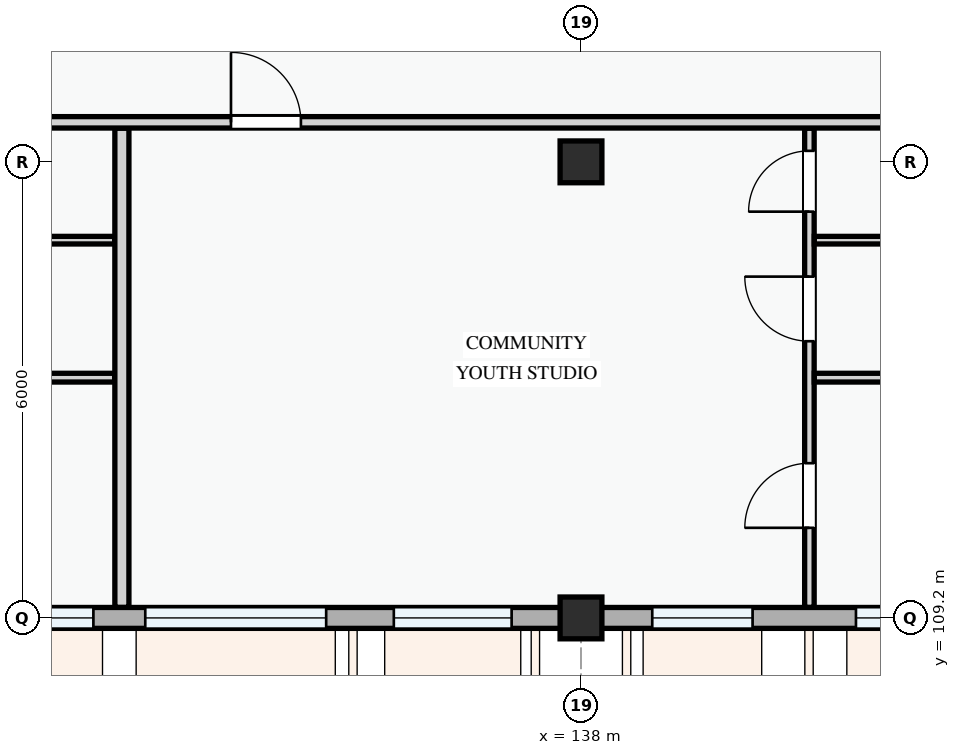
"""IFC4 building model, lengths in metres.
Left out: names, types, materials, properties, quantities, classifications, styles, units other than length and angle.
Written with IfcOpenShell. Run it as: python <this file> out.ifc"""

import sys

from ifc_helpers import new_model, si_unit, direction, frame, frame_2d, origin, origin_2d, place, context, subcontext, project, spatial, rectangle, extrude, element, fill, save


model = new_model("IFC4")
c1 = context("Model", 3, precision=1e-05, world=origin(), true_north=direction((0.0, 1.0)))
c2 = subcontext(c1, "Body", "Model", "MODEL_VIEW")
j1 = project(units=[si_unit("LENGTHUNIT", "METRE"), si_unit("PLANEANGLEUNIT", "RADIAN")], contexts=[c1])
p1 = place(None, origin())
s1 = spatial("IfcSite", under=j1, at=p1, CompositionType="ELEMENT")
p2 = place(p1, origin())
s2 = spatial("IfcBuilding", under=s1, at=p2, CompositionType="ELEMENT")
p3 = place(p2, frame((0.0, 0.0, 27.9)))
s3 = spatial("IfcBuildingStorey", under=s2, at=p3, CompositionType="ELEMENT", Elevation=27.9)
for number, where, z_axis, x_axis in (
    (1, (138.0, 109.2, 0.0), (0.0, 0.0, 1.0), (1.0, 0.0, 0.0)),
    (2, (138.0, 115.2, 0.0), (0.0, 0.0, 1.0), (1.0, 0.0, 0.0)),
):
    element("IfcColumn", number, at=place(p3, frame(where, z_axis=z_axis, x_axis=x_axis)), inside=s3, PredefinedType="COLUMN", context=c2, shape_type="SweptSolid", body=[
        extrude(rectangle(XDim=0.55, YDim=0.55, at=origin_2d()), origin(), (0.0, 0.0, 1.0), 3.3),
    ])
p4 = place(p3, frame((129.6, 109.2, 0.0), z_axis=(0.0, 0.0, 1.0), x_axis=(1.0, 0.0, 0.0)))
e3 = element("IfcWall", 3, at=p4, inside=s3, PredefinedType="STANDARD", context=c2, shape_type="SweptSolid", body=[
    extrude(rectangle(XDim=8.4, YDim=0.275, at=frame_2d((4.2, 0.0))), origin(), (0.0, 0.0, 1.0), 2.375),
])
p5 = place(p4, frame((0.565, 0.0, 0.78)))
e4 = element("IfcOpeningElement", 4, at=p5, cuts=e3, PredefinedType="OPENING", context=c2, shape_type="SweptSolid", body=[
    extrude(rectangle(XDim=1.42, YDim=1.38, at=frame_2d((0.71, 0.69))), frame((0.0, 0.147, 0.0), z_axis=(0.0, -1.0, 0.0), x_axis=(1.0, 0.0, 0.0)), (0.0, 0.0, 1.0), 0.295),
])
p6 = place(p4, frame((2.667, 0.0, 0.78)))
e5 = element("IfcOpeningElement", 5, at=p6, cuts=e3, PredefinedType="OPENING", context=c2, shape_type="SweptSolid", body=[
    extrude(rectangle(XDim=2.38, YDim=1.48, at=frame_2d((1.19, 0.74))), frame((0.0, 0.147, 0.0), z_axis=(0.0, -1.0, 0.0), x_axis=(1.0, 0.0, 0.0)), (0.0, 0.0, 1.0), 0.295),
])
p7 = place(p4, frame((5.938, 0.0, 0.78)))
e6 = element("IfcOpeningElement", 6, at=p7, cuts=e3, PredefinedType="OPENING", context=c2, shape_type="SweptSolid", body=[
    extrude(rectangle(XDim=1.55, YDim=1.4, at=frame_2d((0.775, 0.7))), frame((0.0, 0.147, 0.0), z_axis=(0.0, -1.0, 0.0), x_axis=(1.0, 0.0, 0.0)), (0.0, 0.0, 1.0), 0.295),
])
p8 = place(p3, frame((138.0, 109.2, 0.0), z_axis=(0.0, 0.0, 1.0), x_axis=(1.0, 0.0, 0.0)))
e7 = element("IfcWall", 7, at=p8, inside=s3, PredefinedType="STANDARD", context=c2, shape_type="SweptSolid", body=[
    extrude(rectangle(XDim=6.0, YDim=0.275, at=frame_2d((3.0, 0.0))), origin(), (0.0, 0.0, 1.0), 2.475),
])
p9 = place(p8, frame((0.938, 0.0, 0.78)))
e8 = element("IfcOpeningElement", 8, at=p9, cuts=e7, PredefinedType="OPENING", context=c2, shape_type="SweptSolid", body=[
    extrude(rectangle(XDim=1.32, YDim=1.35, at=frame_2d((0.66, 0.675))), frame((0.0, 0.147, 0.0), z_axis=(0.0, -1.0, 0.0), x_axis=(1.0, 0.0, 0.0)), (0.0, 0.0, 1.0), 0.295),
])
p10 = place(p8, frame((3.617, 0.0, 0.78)))
e9 = element("IfcOpeningElement", 9, at=p10, cuts=e7, PredefinedType="OPENING", context=c2, shape_type="SweptSolid", body=[
    extrude(rectangle(XDim=1.58, YDim=1.48, at=frame_2d((0.79, 0.74))), frame((0.0, 0.147, 0.0), z_axis=(0.0, -1.0, 0.0), x_axis=(1.0, 0.0, 0.0)), (0.0, 0.0, 1.0), 0.295),
])
p11 = place(p3, frame((119.494, 112.361, 0.0), z_axis=(0.0, 0.0, 1.0), x_axis=(1.0, 0.0, 0.0)))
e10 = element("IfcWall", 10, at=p11, inside=s3, PredefinedType="PARTITIONING", context=c2, shape_type="SweptSolid", body=[
    extrude(rectangle(XDim=12.371, YDim=0.115, at=frame_2d((6.186, 0.0))), origin(), (0.0, 0.0, 1.0), 3.0),
])
p12 = place(p3, frame((119.494, 114.17, 0.0), z_axis=(0.0, 0.0, 1.0), x_axis=(1.0, 0.0, 0.0)))
e11 = element("IfcWall", 11, at=p12, inside=s3, PredefinedType="PARTITIONING", context=c2, shape_type="SweptSolid", body=[
    extrude(rectangle(XDim=12.371, YDim=0.1, at=frame_2d((6.186, 0.0))), origin(), (0.0, 0.0, 1.0), 3.0),
])
p13 = place(p3, frame((141.005, 109.34, 0.0), z_axis=(0.0, 0.0, 1.0), x_axis=(0.0, 1.0, 0.0)))
e12 = element("IfcWall", 12, at=p13, inside=s3, PredefinedType="PARTITIONING", context=c2, shape_type="SweptSolid", body=[
    extrude(rectangle(XDim=6.303, YDim=0.125, at=frame_2d((3.152, 0.0))), origin(), (0.0, 0.0, 1.0), 3.0),
])
p14 = place(p13, frame((1.046, 0.0, 0.0)))
e13 = element("IfcOpeningElement", 13, at=p14, cuts=e12, PredefinedType="OPENING", context=c2, shape_type="SweptSolid", body=[
    extrude(rectangle(XDim=0.85, YDim=2.1, at=frame_2d((0.425, 1.05))), frame((0.0, 0.073, 0.0), z_axis=(0.0, -1.0, 0.0), x_axis=(1.0, 0.0, 0.0)), (0.0, 0.0, 1.0), 0.145),
])
p15 = place(p13, frame((3.501, 0.0, 0.0)))
e14 = element("IfcOpeningElement", 14, at=p15, cuts=e12, PredefinedType="OPENING", context=c2, shape_type="SweptSolid", body=[
    extrude(rectangle(XDim=0.85, YDim=2.1, at=frame_2d((0.425, 1.05))), frame((0.0, 0.073, 0.0), z_axis=(0.0, -1.0, 0.0), x_axis=(1.0, 0.0, 0.0)), (0.0, 0.0, 1.0), 0.145),
])
p16 = place(p13, frame((5.205, 0.0, 0.0)))
e15 = element("IfcOpeningElement", 15, at=p16, cuts=e12, PredefinedType="OPENING", context=c2, shape_type="SweptSolid", body=[
    extrude(rectangle(XDim=0.8, YDim=2.1, at=frame_2d((0.4, 1.05))), frame((0.0, 0.073, 0.0), z_axis=(0.0, -1.0, 0.0), x_axis=(1.0, 0.0, 0.0)), (0.0, 0.0, 1.0), 0.145),
])
p17 = place(p3, frame((141.07, 112.361, 0.0), z_axis=(0.0, 0.0, 1.0), x_axis=(1.0, 0.0, 0.0)))
e16 = element("IfcWall", 16, at=p17, inside=s3, PredefinedType="PARTITIONING", context=c2, shape_type="SweptSolid", body=[
    extrude(rectangle(XDim=8.903, YDim=0.115, at=frame_2d((4.452, 0.0))), origin(), (0.0, 0.0, 1.0), 3.0),
])
p18 = place(p3, frame((141.07, 114.17, 0.0), z_axis=(0.0, 0.0, 1.0), x_axis=(1.0, 0.0, 0.0)))
e17 = element("IfcWall", 17, at=p18, inside=s3, PredefinedType="PARTITIONING", context=c2, shape_type="SweptSolid", body=[
    extrude(rectangle(XDim=8.903, YDim=0.1, at=frame_2d((4.452, 0.0))), origin(), (0.0, 0.0, 1.0), 3.0),
])
p19 = place(p3, frame((131.96, 109.34, 0.0), z_axis=(0.0, 0.0, 1.0), x_axis=(0.0, 1.0, 0.0)))
e18 = element("IfcWall", 18, at=p19, inside=s3, PredefinedType="PARTITIONING", context=c2, shape_type="SweptSolid", body=[
    extrude(rectangle(XDim=6.303, YDim=0.185, at=frame_2d((3.152, 0.0))), origin(), (0.0, 0.0, 1.0), 3.0),
])
p20 = place(p3, frame((80.54, 115.72, 0.0), z_axis=(0.0, 0.0, 1.0), x_axis=(1.0, 0.0, 0.0)))
e19 = element("IfcWall", 19, at=p20, inside=s3, PredefinedType="PARTITIONING", context=c2, shape_type="SweptSolid", body=[
    extrude(rectangle(XDim=69.51, YDim=0.15, at=frame_2d((34.755, 0.0))), origin(), (0.0, 0.0, 1.0), 3.0),
])
p21 = place(p20, frame((9.587, 0.0, 0.0)))
e20 = element("IfcOpeningElement", 20, at=p21, cuts=e19, PredefinedType="OPENING", context=c2, shape_type="SweptSolid", body=[
    extrude(rectangle(XDim=0.92, YDim=2.1, at=frame_2d((0.46, 1.05))), frame((0.0, 0.085, 0.0), z_axis=(0.0, -1.0, 0.0), x_axis=(1.0, 0.0, 0.0)), (0.0, 0.0, 1.0), 0.17),
])
p22 = place(p20, frame((37.68, 0.0, 0.0)))
e21 = element("IfcOpeningElement", 21, at=p22, cuts=e19, PredefinedType="OPENING", context=c2, shape_type="SweptSolid", body=[
    extrude(rectangle(XDim=0.92, YDim=2.1, at=frame_2d((0.46, 1.05))), frame((0.0, 0.085, 0.0), z_axis=(0.0, -1.0, 0.0), x_axis=(1.0, 0.0, 0.0)), (0.0, 0.0, 1.0), 0.17),
])
p23 = place(p20, frame((52.856, 0.0, 0.0)))
e22 = element("IfcOpeningElement", 22, at=p23, cuts=e19, PredefinedType="OPENING", context=c2, shape_type="SweptSolid", body=[
    extrude(rectangle(XDim=0.92, YDim=2.1, at=frame_2d((0.46, 1.05))), frame((0.0, 0.085, 0.0), z_axis=(0.0, -1.0, 0.0), x_axis=(1.0, 0.0, 0.0)), (0.0, 0.0, 1.0), 0.17),
])
p24 = place(p5, origin())
e23 = element("IfcWindow", 23, at=p24, inside=s3, PartitioningType="SINGLE_PANEL", PredefinedType="WINDOW", context=c2, shape_type="SweptSolid", body=[
    extrude(rectangle(XDim=1.42, YDim=1.38, at=frame_2d((0.71, 0.69))), frame((0.0, 0.03, 0.0), z_axis=(0.0, -1.0, 0.0), x_axis=(1.0, 0.0, 0.0)), (0.0, 0.0, 1.0), 0.06),
])
fill(e4, e23)
p25 = place(p6, origin())
e24 = element("IfcWindow", 24, at=p25, inside=s3, PartitioningType="DOUBLE_PANEL_VERTICAL", PredefinedType="WINDOW", context=c2, shape_type="SweptSolid", body=[
    extrude(rectangle(XDim=2.38, YDim=1.48, at=frame_2d((1.19, 0.74))), frame((0.0, 0.03, 0.0), z_axis=(0.0, -1.0, 0.0), x_axis=(1.0, 0.0, 0.0)), (0.0, 0.0, 1.0), 0.06),
])
fill(e5, e24)
p26 = place(p7, origin())
e25 = element("IfcWindow", 25, at=p26, inside=s3, PartitioningType="SINGLE_PANEL", PredefinedType="WINDOW", context=c2, shape_type="SweptSolid", body=[
    extrude(rectangle(XDim=1.55, YDim=1.4, at=frame_2d((0.775, 0.7))), frame((0.0, 0.03, 0.0), z_axis=(0.0, -1.0, 0.0), x_axis=(1.0, 0.0, 0.0)), (0.0, 0.0, 1.0), 0.06),
])
fill(e6, e25)
p27 = place(p9, origin())
e26 = element("IfcWindow", 26, at=p27, inside=s3, PartitioningType="SINGLE_PANEL", PredefinedType="WINDOW", context=c2, shape_type="SweptSolid", body=[
    extrude(rectangle(XDim=1.32, YDim=1.35, at=frame_2d((0.66, 0.675))), frame((0.0, 0.03, 0.0), z_axis=(0.0, -1.0, 0.0), x_axis=(1.0, 0.0, 0.0)), (0.0, 0.0, 1.0), 0.06),
])
fill(e8, e26)
p28 = place(p10, origin())
e27 = element("IfcWindow", 27, at=p28, inside=s3, PartitioningType="SINGLE_PANEL", PredefinedType="WINDOW", context=c2, shape_type="SweptSolid", body=[
    extrude(rectangle(XDim=1.58, YDim=1.48, at=frame_2d((0.79, 0.74))), frame((0.0, 0.03, 0.0), z_axis=(0.0, -1.0, 0.0), x_axis=(1.0, 0.0, 0.0)), (0.0, 0.0, 1.0), 0.06),
])
fill(e9, e27)
p29 = place(p14, origin())
e28 = element("IfcDoor", 28, at=p29, inside=s3, OperationType="SINGLE_SWING_LEFT", PredefinedType="DOOR", context=c2, shape_type="SweptSolid", body=[
    extrude(rectangle(XDim=0.85, YDim=2.1, at=frame_2d((0.425, 1.05))), frame((0.0, 0.025, 0.0), z_axis=(0.0, -1.0, 0.0), x_axis=(1.0, 0.0, 0.0)), (0.0, 0.0, 1.0), 0.05),
])
fill(e13, e28)
p30 = place(p15, origin())
e29 = element("IfcDoor", 29, at=p30, inside=s3, OperationType="SINGLE_SWING_RIGHT", PredefinedType="DOOR", context=c2, shape_type="SweptSolid", body=[
    extrude(rectangle(XDim=0.85, YDim=2.1, at=frame_2d((0.425, 1.05))), frame((0.0, 0.025, 0.0), z_axis=(0.0, -1.0, 0.0), x_axis=(1.0, 0.0, 0.0)), (0.0, 0.0, 1.0), 0.05),
])
fill(e14, e29)
p31 = place(p16, origin())
e30 = element("IfcDoor", 30, at=p31, inside=s3, OperationType="SINGLE_SWING_LEFT", PredefinedType="DOOR", context=c2, shape_type="SweptSolid", body=[
    extrude(rectangle(XDim=0.8, YDim=2.1, at=frame_2d((0.4, 1.05))), frame((0.0, 0.025, 0.0), z_axis=(0.0, -1.0, 0.0), x_axis=(1.0, 0.0, 0.0)), (0.0, 0.0, 1.0), 0.05),
])
fill(e15, e30)
p32 = place(p23, origin())
e31 = element("IfcDoor", 31, at=p32, inside=s3, OperationType="SINGLE_SWING_LEFT", PredefinedType="DOOR", context=c2, shape_type="SweptSolid", body=[
    extrude(rectangle(XDim=0.92, YDim=2.1, at=frame_2d((0.46, 1.05))), frame((0.0, 0.025, 0.0), z_axis=(0.0, -1.0, 0.0), x_axis=(1.0, 0.0, 0.0)), (0.0, 0.0, 1.0), 0.05),
])
fill(e22, e31)
save(model, sys.argv[1])
